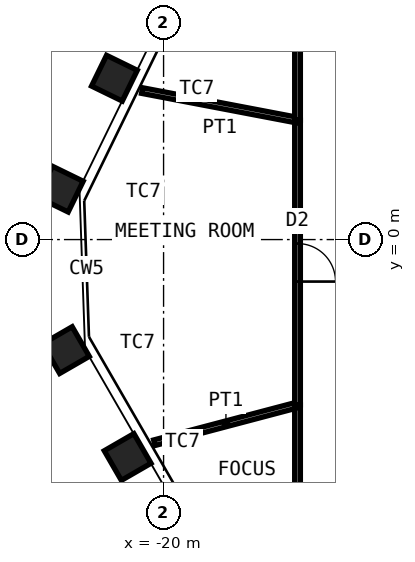
"""IFC4 building model, lengths in metres.
Left out: names, types, materials, properties, quantities, classifications, styles, units other than length and angle.
Written with IfcOpenShell. Run it as: python <this file> out.ifc"""

import sys

from ifc_helpers import new_model, si_unit, direction, frame, frame_2d, origin, origin_2d, place, context, subcontext, project, spatial, rectangle, hollow_rectangle, extrude, element, fill, save


model = new_model("IFC4")
c1 = context("Model", 3, precision=1e-05, world=origin(), true_north=direction((0.0, 1.0)))
c2 = subcontext(c1, "Body", "Model", "MODEL_VIEW")
j1 = project(units=[si_unit("LENGTHUNIT", "METRE"), si_unit("PLANEANGLEUNIT", "RADIAN")], contexts=[c1])
p1 = place(None, origin())
s1 = spatial("IfcSite", under=j1, at=p1, CompositionType="ELEMENT")
p2 = place(p1, origin())
s2 = spatial("IfcBuilding", under=s1, at=p2, CompositionType="ELEMENT")
p3 = place(p2, frame((0.0, 0.0, 270.4)))
s3 = spatial("IfcBuildingStorey", under=s2, at=p3, CompositionType="ELEMENT", Elevation=270.4)
for number, where, z_axis, x_axis in (
    (1, (-20.946, -5.721, 0.0), (0.0, 0.0, 1.0), (0.5, -0.866, 0.0)),
    (2, (-22.57, -2.908, 0.0), (0.0, 0.0, 1.0), (0.5, -0.866, 0.0)),
    (3, (-22.717, 1.327, 0.0), (0.0, 0.0, 1.0), (-0.438, -0.899, 0.0)),
    (4, (-21.293, 4.246, 0.0), (0.0, 0.0, 1.0), (-0.438, -0.899, 0.0)),
):
    element("IfcColumn", number, at=place(p3, frame(where, z_axis=z_axis, x_axis=x_axis)), inside=s3, PredefinedType="COLUMN", context=c2, shape_type="SweptSolid", body=[
        extrude(hollow_rectangle(XDim=0.9, YDim=0.9, WallThickness=0.06, at=origin_2d()), origin(), (0.0, 0.0, 1.0), 4.2),
    ])
p4 = place(p3, frame((-16.475, -10.601, 0.0), z_axis=(0.0, 0.0, 1.0), x_axis=(0.0, 1.0, 0.0)))
e5 = element("IfcWall", 5, at=p4, inside=s3, PredefinedType="PARTITIONING", context=c2, shape_type="SweptSolid", body=[
    extrude(rectangle(XDim=6.25, YDim=0.15, at=frame_2d((3.125, 0.0))), origin(), (0.0, 0.0, 1.0), 4.03),
])
p5 = place(p4, frame((2.625, 0.0, 0.0)))
e6 = element("IfcOpeningElement", 6, at=p5, cuts=e5, PredefinedType="OPENING", context=c2, shape_type="SweptSolid", body=[
    extrude(rectangle(XDim=1.0, YDim=2.4, at=frame_2d((0.5, 1.2))), frame((0.0, 0.085, 0.0), z_axis=(0.0, -1.0, 0.0), x_axis=(1.0, 0.0, 0.0)), (0.0, 0.0, 1.0), 0.17),
])
p6 = place(p3, frame((-20.243, -5.346, 0.0), z_axis=(0.0, 0.0, 1.0), x_axis=(0.966843659694, 0.25536902261, 0.0)))
e7 = element("IfcWall", 7, at=p6, inside=s3, PredefinedType="PARTITIONING", context=c2, shape_type="SweptSolid", body=[
    extrude(rectangle(XDim=3.897, YDim=0.15, at=frame_2d((1.948, 0.0))), origin(), (0.0, 0.0, 1.0), 3.33),
])
p7 = place(p3, frame((-16.475, -4.351, 0.0), z_axis=(0.0, 0.0, 1.0), x_axis=(0.0, 1.0, 0.0)))
e8 = element("IfcWall", 8, at=p7, inside=s3, PredefinedType="PARTITIONING", context=c2, shape_type="SweptSolid", body=[
    extrude(rectangle(XDim=7.492, YDim=0.15, at=frame_2d((3.746, 0.0))), origin(), (0.0, 0.0, 1.0), 4.03),
])
p8 = place(p7, frame((3.246, 0.0, 0.0)))
e9 = element("IfcOpeningElement", 9, at=p8, cuts=e8, PredefinedType="OPENING", context=c2, shape_type="SweptSolid", body=[
    extrude(rectangle(XDim=1.0, YDim=2.4, at=frame_2d((0.5, 1.2))), frame((0.0, 0.085, 0.0), z_axis=(0.0, -1.0, 0.0), x_axis=(1.0, 0.0, 0.0)), (0.0, 0.0, 1.0), 0.17),
])
p9 = place(p3, frame((-20.566, 3.921, 0.0), z_axis=(0.0, 0.0, 1.0), x_axis=(0.982304172816, -0.187292584123, 0.0)))
e10 = element("IfcWall", 10, at=p9, inside=s3, PredefinedType="PARTITIONING", context=c2, shape_type="SweptSolid", body=[
    extrude(rectangle(XDim=4.165, YDim=0.15, at=frame_2d((2.083, 0.0))), origin(), (0.0, 0.0, 1.0), 3.33),
])
p10 = place(p3, frame((-16.475, 3.141, 0.0), z_axis=(0.0, 0.0, 1.0), x_axis=(0.0, 1.0, 0.0)))
e11 = element("IfcWall", 11, at=p10, inside=s3, PredefinedType="PARTITIONING", context=c2, shape_type="SweptSolid", body=[
    extrude(rectangle(XDim=8.234, YDim=0.15, at=frame_2d((4.117, 0.0))), origin(), (0.0, 0.0, 1.0), 4.03),
])
p11 = place(p10, frame((3.217, 0.0, 0.0)))
e12 = element("IfcOpeningElement", 12, at=p11, cuts=e11, PredefinedType="OPENING", context=c2, shape_type="SweptSolid", body=[
    extrude(rectangle(XDim=1.8, YDim=2.4, at=frame_2d((0.9, 1.2))), frame((0.0, 0.085, 0.0), z_axis=(0.0, -1.0, 0.0), x_axis=(1.0, 0.0, 0.0)), (0.0, 0.0, 1.0), 0.17),
])
p12 = place(p8, origin())
e13 = element("IfcDoor", 13, at=p12, inside=s3, OperationType="SINGLE_SWING_LEFT", PredefinedType="DOOR", context=c2, shape_type="SweptSolid", body=[
    extrude(rectangle(XDim=1.0, YDim=2.4, at=frame_2d((0.5, 1.2))), frame((0.0, 0.025, 0.0), z_axis=(0.0, -1.0, 0.0), x_axis=(1.0, 0.0, 0.0)), (0.0, 0.0, 1.0), 0.05),
])
fill(e9, e13)
save(model, sys.argv[1])
